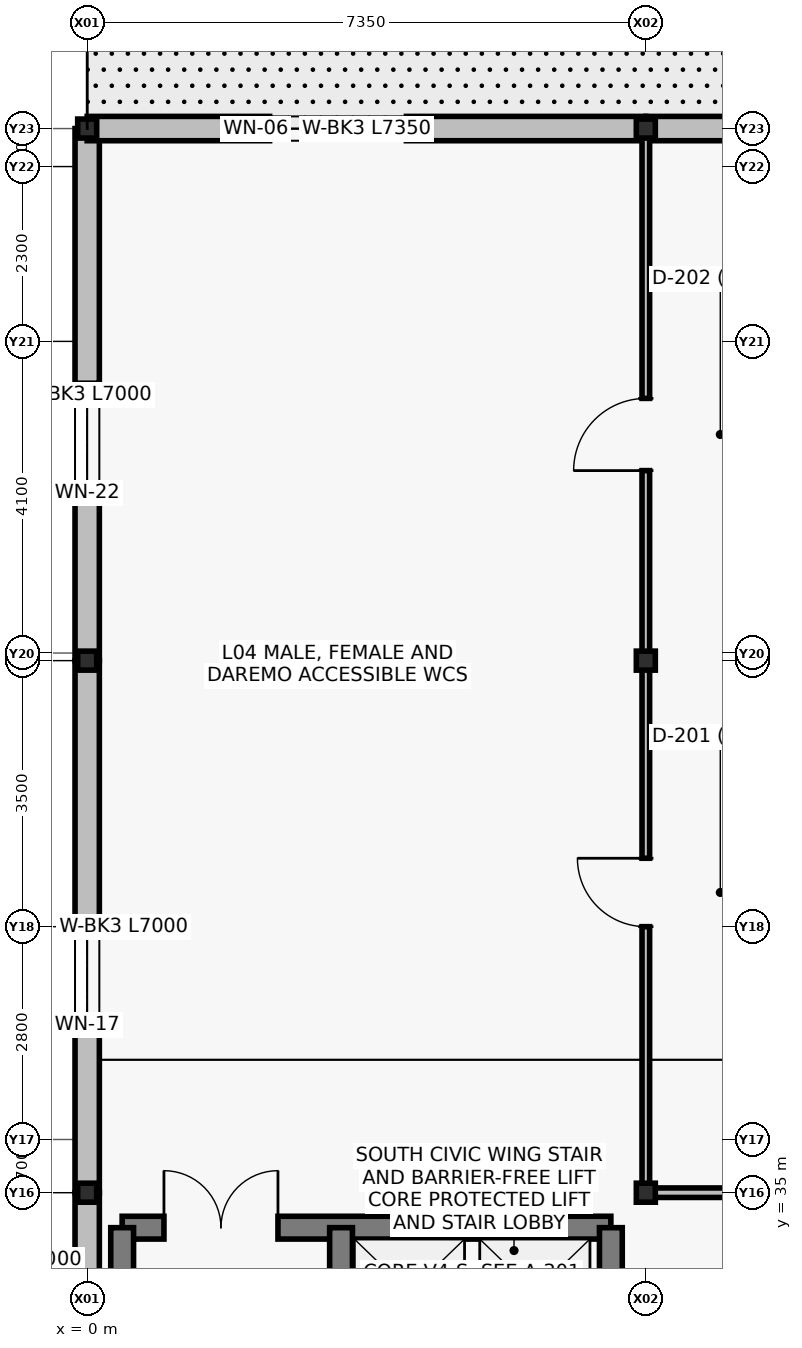
"""IFC4 building model, lengths in metres.
Left out: names, types, materials, properties, quantities, classifications, styles, units other than length and angle.
Written with IfcOpenShell. Run it as: python <this file> out.ifc"""

import sys

from ifc_helpers import new_model, si_unit, direction, frame, frame_2d, origin, origin_2d, place, context, subcontext, project, spatial, rectangle, i_section, extrude, element, fill, save


model = new_model("IFC4")
c1 = context("Model", 3, precision=1e-05, world=origin(), true_north=direction((0.0, 1.0)))
c2 = subcontext(c1, "Body", "Model", "MODEL_VIEW")
j1 = project(units=[si_unit("LENGTHUNIT", "METRE"), si_unit("PLANEANGLEUNIT", "RADIAN")], contexts=[c1])
p1 = place(None, origin())
s1 = spatial("IfcSite", under=j1, at=p1, CompositionType="ELEMENT")
p2 = place(p1, origin())
s2 = spatial("IfcBuilding", under=s1, at=p2, CompositionType="ELEMENT")
p3 = place(p2, frame((0.0, 0.0, 15.3)))
s3 = spatial("IfcBuildingStorey", under=s2, at=p3, CompositionType="ELEMENT", Elevation=15.3)
for number, where, z_axis, x_axis in (
    (1, (0.0, 35.0, 0.0), (0.0, 0.0, 1.0), (1.0, 0.0, 0.0)),
    (2, (0.0, 42.0, 0.0), (0.0, 0.0, 1.0), (1.0, 0.0, 0.0)),
    (3, (0.0, 49.0, 0.0), (0.0, 0.0, 1.0), (1.0, 0.0, 0.0)),
    (4, (7.35, 35.0, 0.0), (0.0, 0.0, 1.0), (1.0, 0.0, 0.0)),
    (5, (7.35, 42.0, 0.0), (0.0, 0.0, 1.0), (1.0, 0.0, 0.0)),
    (6, (7.35, 49.0, 0.0), (0.0, 0.0, 1.0), (1.0, 0.0, 0.0)),
):
    element("IfcColumn", number, at=place(p3, frame(where, z_axis=z_axis, x_axis=x_axis)), inside=s3, PredefinedType="COLUMN", context=c2, shape_type="SweptSolid", body=[
        extrude(i_section(OverallWidth=0.25, OverallDepth=0.25, WebThickness=0.009, FlangeThickness=0.014, at=origin_2d()), origin(), (0.0, 0.0, 1.0), 4.2),
    ])
p4 = place(p3, frame((0.0, 28.0, 0.0), z_axis=(0.0, 0.0, 1.0), x_axis=(0.0, 1.0, 0.0)))
e7 = element("IfcWall", 7, at=p4, inside=s3, PredefinedType="SOLIDWALL", context=c2, shape_type="SweptSolid", body=[
    extrude(rectangle(XDim=7.0, YDim=0.32, at=frame_2d((3.5, 0.0))), origin(), (0.0, 0.0, 1.0), 3.45),
])
p5 = place(p4, frame((2.2, 0.0, 0.9)))
e8 = element("IfcOpeningElement", 8, at=p5, cuts=e7, PredefinedType="OPENING", context=c2, shape_type="SweptSolid", body=[
    extrude(rectangle(XDim=2.8, YDim=2.1, at=frame_2d((1.4, 1.05))), frame((0.0, 0.17, 0.0), z_axis=(0.0, -1.0, 0.0), x_axis=(1.0, 0.0, 0.0)), (0.0, 0.0, 1.0), 0.34),
])
p6 = place(p3, frame((0.0, 35.0, 0.0), z_axis=(0.0, 0.0, 1.0), x_axis=(0.0, 1.0, 0.0)))
e9 = element("IfcWall", 9, at=p6, inside=s3, PredefinedType="SOLIDWALL", context=c2, shape_type="SweptSolid", body=[
    extrude(rectangle(XDim=7.0, YDim=0.32, at=frame_2d((3.5, 0.0))), origin(), (0.0, 0.0, 1.0), 3.45),
])
p7 = place(p6, frame((2.2, 0.0, 0.9)))
e10 = element("IfcOpeningElement", 10, at=p7, cuts=e9, PredefinedType="OPENING", context=c2, shape_type="SweptSolid", body=[
    extrude(rectangle(XDim=1.35, YDim=1.65, at=frame_2d((0.675, 0.825))), frame((0.0, 0.17, 0.0), z_axis=(0.0, -1.0, 0.0), x_axis=(1.0, 0.0, 0.0)), (0.0, 0.0, 1.0), 0.34),
])
p8 = place(p3, frame((0.0, 42.0, 0.0), z_axis=(0.0, 0.0, 1.0), x_axis=(0.0, 1.0, 0.0)))
e11 = element("IfcWall", 11, at=p8, inside=s3, PredefinedType="SOLIDWALL", context=c2, shape_type="SweptSolid", body=[
    extrude(rectangle(XDim=7.0, YDim=0.32, at=frame_2d((3.5, 0.0))), origin(), (0.0, 0.0, 1.0), 3.45),
])
p9 = place(p8, frame((2.2, 0.0, 0.9)))
e12 = element("IfcOpeningElement", 12, at=p9, cuts=e11, PredefinedType="OPENING", context=c2, shape_type="SweptSolid", body=[
    extrude(rectangle(XDim=1.45, YDim=1.75, at=frame_2d((0.725, 0.875))), frame((0.0, 0.17, 0.0), z_axis=(0.0, -1.0, 0.0), x_axis=(1.0, 0.0, 0.0)), (0.0, 0.0, 1.0), 0.34),
])
p10 = place(p3, frame((0.0, 49.0, 0.0), z_axis=(0.0, 0.0, 1.0), x_axis=(1.0, 0.0, 0.0)))
e13 = element("IfcWall", 13, at=p10, inside=s3, PredefinedType="SOLIDWALL", context=c2, shape_type="SweptSolid", body=[
    extrude(rectangle(XDim=7.35, YDim=0.32, at=frame_2d((3.675, 0.0))), origin(), (0.0, 0.0, 1.0), 3.45),
])
p11 = place(p10, frame((2.4, 0.0, 0.9)))
e14 = element("IfcOpeningElement", 14, at=p11, cuts=e13, PredefinedType="OPENING", context=c2, shape_type="SweptSolid", body=[
    extrude(rectangle(XDim=1.8, YDim=2.1, at=frame_2d((0.9, 1.05))), frame((0.0, 0.17, 0.0), z_axis=(0.0, -1.0, 0.0), x_axis=(1.0, 0.0, 0.0)), (0.0, 0.0, 1.0), 0.34),
])
p12 = place(p3, frame((7.35, 49.0, 0.0), z_axis=(0.0, 0.0, 1.0), x_axis=(1.0, 0.0, 0.0)))
e15 = element("IfcWall", 15, at=p12, inside=s3, PredefinedType="SOLIDWALL", context=c2, shape_type="SweptSolid", body=[
    extrude(rectangle(XDim=7.35, YDim=0.32, at=frame_2d((3.675, 0.0))), origin(), (0.0, 0.0, 1.0), 3.45),
])
p13 = place(p12, frame((2.4, 0.0, 0.9)))
e16 = element("IfcOpeningElement", 16, at=p13, cuts=e15, PredefinedType="OPENING", context=c2, shape_type="SweptSolid", body=[
    extrude(rectangle(XDim=2.0, YDim=1.8, at=frame_2d((1.0, 0.9))), frame((0.0, 0.17, 0.0), z_axis=(0.0, -1.0, 0.0), x_axis=(1.0, 0.0, 0.0)), (0.0, 0.0, 1.0), 0.34),
])
p14 = place(p3, frame((0.46, 34.54, 0.0), z_axis=(0.0, 0.0, 1.0), x_axis=(1.0, 0.0, 0.0)))
e17 = element("IfcWall", 17, at=p14, inside=s3, PredefinedType="SHEAR", context=c2, shape_type="SweptSolid", body=[
    extrude(rectangle(XDim=6.43, YDim=0.3, at=frame_2d((3.215, 0.0))), origin(), (0.0, 0.0, 1.0), 3.92),
])
p15 = place(p14, frame((0.55, 0.0, 0.0)))
e18 = element("IfcOpeningElement", 18, at=p15, cuts=e17, PredefinedType="OPENING", context=c2, shape_type="SweptSolid", body=[
    extrude(rectangle(XDim=1.5, YDim=2.2, at=frame_2d((0.75, 1.1))), frame((0.0, 0.16, 0.0), z_axis=(0.0, -1.0, 0.0), x_axis=(1.0, 0.0, 0.0)), (0.0, 0.0, 1.0), 0.32),
])
for number, where, z_axis, x_axis in (
    (19, (0.46, 28.46, 0.0), (0.0, 0.0, 1.0), (0.0, 1.0, 0.0)),
    (20, (6.89, 28.46, 0.0), (0.0, 0.0, 1.0), (0.0, 1.0, 0.0)),
):
    element("IfcWall", number, at=place(p3, frame(where, z_axis=z_axis, x_axis=x_axis)), inside=s3, PredefinedType="SHEAR", context=c2, shape_type="SweptSolid", body=[
        extrude(rectangle(XDim=6.08, YDim=0.3, at=frame_2d((3.04, 0.0))), origin(), (0.0, 0.0, 1.0), 3.92),
    ])
p16 = place(p3, frame((3.34, 32.79, 0.0), z_axis=(0.0, 0.0, 1.0), x_axis=(0.0, 1.0, 0.0)))
e21 = element("IfcWall", 21, at=p16, inside=s3, PredefinedType="SHEAR", context=c2, shape_type="SweptSolid", body=[
    extrude(rectangle(XDim=1.75, YDim=0.3, at=frame_2d((0.875, 0.0))), origin(), (0.0, 0.0, 1.0), 3.92),
])
p17 = place(p3, frame((7.35, 35.0, 0.0), z_axis=(0.0, 0.0, 1.0), x_axis=(1.0, 0.0, 0.0)))
e22 = element("IfcWall", 22, at=p17, inside=s3, PredefinedType="PARTITIONING", context=c2, shape_type="SweptSolid", body=[
    extrude(rectangle(XDim=14.7, YDim=0.125, at=frame_2d((7.35, 0.0))), origin(), (0.0, 0.0, 1.0), 3.2),
])
p18 = place(p17, frame((4.0, 0.0, 0.0)))
e23 = element("IfcOpeningElement", 23, at=p18, cuts=e22, PredefinedType="OPENING", context=c2, shape_type="SweptSolid", body=[
    extrude(rectangle(XDim=1.1, YDim=2.1, at=frame_2d((0.55, 1.05))), frame((0.0, 0.072, 0.0), z_axis=(0.0, -1.0, 0.0), x_axis=(1.0, 0.0, 0.0)), (0.0, 0.0, 1.0), 0.145),
])
p19 = place(p3, frame((7.35, 35.0, 0.0), z_axis=(0.0, 0.0, 1.0), x_axis=(0.0, 1.0, 0.0)))
e24 = element("IfcWall", 24, at=p19, inside=s3, PredefinedType="PARTITIONING", context=c2, shape_type="SweptSolid", body=[
    extrude(rectangle(XDim=14.0, YDim=0.1, at=frame_2d((7.0, 0.0))), origin(), (0.0, 0.0, 1.0), 3.2),
])
p20 = place(p19, frame((3.5, 0.0, 0.0)))
e25 = element("IfcOpeningElement", 25, at=p20, cuts=e24, PredefinedType="OPENING", context=c2, shape_type="SweptSolid", body=[
    extrude(rectangle(XDim=0.9, YDim=2.1, at=frame_2d((0.45, 1.05))), frame((0.0, 0.06, 0.0), z_axis=(0.0, -1.0, 0.0), x_axis=(1.0, 0.0, 0.0)), (0.0, 0.0, 1.0), 0.12),
])
p21 = place(p19, frame((9.5, 0.0, 0.0)))
e26 = element("IfcOpeningElement", 26, at=p21, cuts=e24, PredefinedType="OPENING", context=c2, shape_type="SweptSolid", body=[
    extrude(rectangle(XDim=0.95, YDim=2.2, at=frame_2d((0.475, 1.1))), frame((0.0, 0.06, 0.0), z_axis=(0.0, -1.0, 0.0), x_axis=(1.0, 0.0, 0.0)), (0.0, 0.0, 1.0), 0.12),
])
p22 = place(p7, origin())
e27 = element("IfcWindow", 27, at=p22, inside=s3, PartitioningType="SINGLE_PANEL", PredefinedType="WINDOW", context=c2, shape_type="SweptSolid", body=[
    extrude(rectangle(XDim=1.35, YDim=1.65, at=frame_2d((0.675, 0.825))), frame((0.0, 0.03, 0.0), z_axis=(0.0, -1.0, 0.0), x_axis=(1.0, 0.0, 0.0)), (0.0, 0.0, 1.0), 0.06),
])
fill(e10, e27)
p23 = place(p9, origin())
e28 = element("IfcWindow", 28, at=p23, inside=s3, PartitioningType="SINGLE_PANEL", PredefinedType="WINDOW", context=c2, shape_type="SweptSolid", body=[
    extrude(rectangle(XDim=1.45, YDim=1.75, at=frame_2d((0.725, 0.875))), frame((0.0, 0.03, 0.0), z_axis=(0.0, -1.0, 0.0), x_axis=(1.0, 0.0, 0.0)), (0.0, 0.0, 1.0), 0.06),
])
fill(e12, e28)
p24 = place(p11, origin())
e29 = element("IfcWindow", 29, at=p24, inside=s3, PartitioningType="SINGLE_PANEL", PredefinedType="WINDOW", context=c2, shape_type="SweptSolid", body=[
    extrude(rectangle(XDim=1.8, YDim=2.1, at=frame_2d((0.9, 1.05))), frame((0.0, 0.03, 0.0), z_axis=(0.0, -1.0, 0.0), x_axis=(1.0, 0.0, 0.0)), (0.0, 0.0, 1.0), 0.06),
])
fill(e14, e29)
p25 = place(p15, origin())
e30 = element("IfcDoor", 30, at=p25, inside=s3, OperationType="DOUBLE_DOOR_SINGLE_SWING", PredefinedType="DOOR", context=c2, shape_type="SweptSolid", body=[
    extrude(rectangle(XDim=1.5, YDim=2.2, at=frame_2d((0.75, 1.1))), frame((0.0, 0.025, 0.0), z_axis=(0.0, -1.0, 0.0), x_axis=(1.0, 0.0, 0.0)), (0.0, 0.0, 1.0), 0.05),
])
fill(e18, e30)
p26 = place(p20, origin())
e31 = element("IfcDoor", 31, at=p26, inside=s3, OperationType="SINGLE_SWING_RIGHT", PredefinedType="DOOR", context=c2, shape_type="SweptSolid", body=[
    extrude(rectangle(XDim=0.9, YDim=2.1, at=frame_2d((0.45, 1.05))), frame((0.0, 0.025, 0.0), z_axis=(0.0, -1.0, 0.0), x_axis=(1.0, 0.0, 0.0)), (0.0, 0.0, 1.0), 0.05),
])
fill(e25, e31)
p27 = place(p21, origin())
e32 = element("IfcDoor", 32, at=p27, inside=s3, OperationType="SINGLE_SWING_LEFT", PredefinedType="DOOR", context=c2, shape_type="SweptSolid", body=[
    extrude(rectangle(XDim=0.95, YDim=2.2, at=frame_2d((0.475, 1.1))), frame((0.0, 0.025, 0.0), z_axis=(0.0, -1.0, 0.0), x_axis=(1.0, 0.0, 0.0)), (0.0, 0.0, 1.0), 0.05),
])
fill(e26, e32)
save(model, sys.argv[1])
